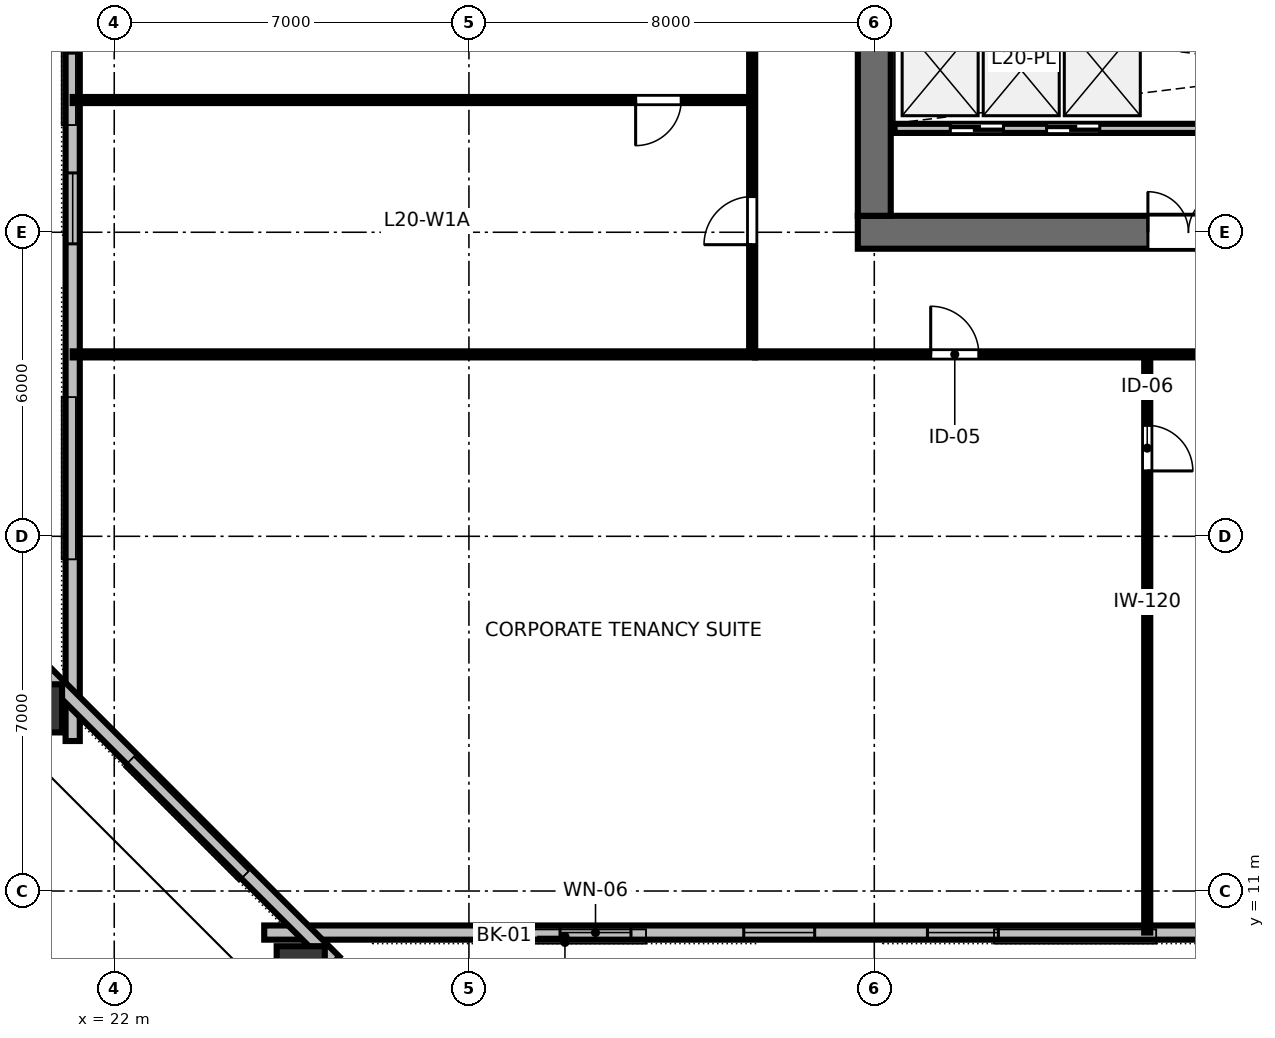
"""IFC4 building model, lengths in metres.
Left out: names, types, materials, properties, quantities, classifications, styles, units other than length and angle.
Written with IfcOpenShell. Run it as: python <this file> out.ifc"""

import sys

from ifc_helpers import new_model, si_unit, direction, frame, frame_2d, origin, origin_2d, place, context, subcontext, project, spatial, rectangle, hollow_rectangle, extrude, element, fill, save


model = new_model("IFC4")
c1 = context("Model", 3, precision=1e-05, world=origin(), true_north=direction((0.0, 1.0)))
c2 = subcontext(c1, "Body", "Model", "MODEL_VIEW")
j1 = project(units=[si_unit("LENGTHUNIT", "METRE"), si_unit("PLANEANGLEUNIT", "RADIAN")], contexts=[c1])
p1 = place(None, origin())
s1 = spatial("IfcSite", under=j1, at=p1, CompositionType="ELEMENT")
p2 = place(p1, origin())
s2 = spatial("IfcBuilding", under=s1, at=p2, CompositionType="ELEMENT")
p3 = place(p2, frame((0.0, 0.0, 78.4)))
s3 = spatial("IfcBuildingStorey", under=s2, at=p3, CompositionType="ELEMENT", Elevation=78.4)
p4 = place(p3, frame((36.675, 24.0, 0.0), z_axis=(0.0, 0.0, 1.0), x_axis=(1.0, 0.0, 0.0)))
e1 = element("IfcWall", 1, at=p4, inside=s3, PredefinedType="SHEAR", context=c2, shape_type="SweptSolid", body=[
    extrude(rectangle(XDim=18.65, YDim=0.65, at=frame_2d((9.325, 0.0))), origin(), (0.0, 0.0, 1.0), 3.36),
])
p5 = place(p4, frame((5.725, 0.0, 0.0)))
e2 = element("IfcOpeningElement", 2, at=p5, cuts=e1, PredefinedType="OPENING", context=c2, shape_type="SweptSolid", body=[
    extrude(rectangle(XDim=1.6, YDim=2.15, at=frame_2d((0.8, 1.075))), frame((0.0, 0.335, 0.0), z_axis=(0.0, -1.0, 0.0), x_axis=(1.0, 0.0, 0.0)), (0.0, 0.0, 1.0), 0.67),
])
p6 = place(p4, frame((12.125, 0.0, 0.0)))
e3 = element("IfcOpeningElement", 3, at=p6, cuts=e1, PredefinedType="OPENING", context=c2, shape_type="SweptSolid", body=[
    extrude(rectangle(XDim=1.6, YDim=2.15, at=frame_2d((0.8, 1.075))), frame((0.0, 0.335, 0.0), z_axis=(0.0, -1.0, 0.0), x_axis=(1.0, 0.0, 0.0)), (0.0, 0.0, 1.0), 0.67),
])
p7 = place(p3, frame((37.0, 24.325, 0.0), z_axis=(0.0, 0.0, 1.0), x_axis=(0.0, 1.0, 0.0)))
e4 = element("IfcWall", 4, at=p7, inside=s3, PredefinedType="SHEAR", context=c2, shape_type="SweptSolid", body=[
    extrude(rectangle(XDim=15.35, YDim=0.65, at=frame_2d((7.675, 0.0))), origin(), (0.0, 0.0, 1.0), 3.36),
])
p8 = place(p7, frame((5.2, 0.0, 0.0)))
e5 = element("IfcOpeningElement", 5, at=p8, cuts=e4, PredefinedType="OPENING", context=c2, shape_type="SweptSolid", body=[
    extrude(rectangle(XDim=1.15, YDim=2.15, at=frame_2d((0.575, 1.075))), frame((0.0, 0.335, 0.0), z_axis=(0.0, -1.0, 0.0), x_axis=(1.0, 0.0, 0.0)), (0.0, 0.0, 1.0), 0.67),
])
p9 = place(p3, frame((25.681, 9.336, 0.0), z_axis=(0.227706652534, 0.158346926777, 0.960768406627), x_axis=(-0.570924282853, 0.821002718174, 0.0)))
e6 = element("IfcColumn", 6, at=p9, inside=s3, PredefinedType="COLUMN", context=c2, shape_type="SweptSolid", body=[
    extrude(hollow_rectangle(XDim=0.95, YDim=1.15, WallThickness=0.06, at=origin_2d()), origin(), (0.0, 0.0, 1.0), 3.495),
])
p10 = place(p3, frame((20.396, 14.604, 0.0), z_axis=(0.186998264307, 0.199376234682, 0.961915155401), x_axis=(-0.658048855079, -0.701607062764, 0.273348191525)))
e7 = element("IfcColumn", 7, at=p10, inside=s3, PredefinedType="COLUMN", context=c2, shape_type="SweptSolid", body=[
    extrude(hollow_rectangle(XDim=0.95, YDim=1.15, WallThickness=0.06, at=origin_2d()), origin(), (0.0, 0.0, 1.0), 3.491),
])
p11 = place(p3, frame((24.96, 10.18, 0.0), z_axis=(0.0, 0.0, 1.0), x_axis=(1.0, 0.0, 0.0)))
e8 = element("IfcWall", 8, at=p11, inside=s3, PredefinedType="STANDARD", context=c2, shape_type="SweptSolid", body=[
    extrude(rectangle(XDim=42.08, YDim=0.28, at=frame_2d((21.04, 0.0))), origin(), (0.0, 0.0, 1.0), 2.662),
])
p12 = place(p11, frame((5.838, 0.0, 0.85)))
e9 = element("IfcOpeningElement", 9, at=p12, cuts=e8, PredefinedType="OPENING", context=c2, shape_type="SweptSolid", body=[
    extrude(rectangle(XDim=1.4, YDim=1.2, at=frame_2d((0.7, 0.6))), frame((0.0, 0.15, 0.0), z_axis=(0.0, -1.0, 0.0), x_axis=(1.0, 0.0, 0.0)), (0.0, 0.0, 1.0), 0.3),
])
p13 = place(p11, frame((9.464, 0.0, 0.85)))
e10 = element("IfcOpeningElement", 10, at=p13, cuts=e8, PredefinedType="OPENING", context=c2, shape_type="SweptSolid", body=[
    extrude(rectangle(XDim=1.4, YDim=1.2, at=frame_2d((0.7, 0.6))), frame((0.0, 0.15, 0.0), z_axis=(0.0, -1.0, 0.0), x_axis=(1.0, 0.0, 0.0)), (0.0, 0.0, 1.0), 0.3),
])
p14 = place(p11, frame((13.089, 0.0, 0.85)))
e11 = element("IfcOpeningElement", 11, at=p14, cuts=e8, PredefinedType="OPENING", context=c2, shape_type="SweptSolid", body=[
    extrude(rectangle(XDim=1.4, YDim=1.2, at=frame_2d((0.7, 0.6))), frame((0.0, 0.15, 0.0), z_axis=(0.0, -1.0, 0.0), x_axis=(1.0, 0.0, 0.0)), (0.0, 0.0, 1.0), 0.3),
])
p15 = place(p11, frame((23.966, 0.0, 0.85)))
e12 = element("IfcOpeningElement", 12, at=p15, cuts=e8, PredefinedType="OPENING", context=c2, shape_type="SweptSolid", body=[
    extrude(rectangle(XDim=1.4, YDim=1.2, at=frame_2d((0.7, 0.6))), frame((0.0, 0.15, 0.0), z_axis=(0.0, -1.0, 0.0), x_axis=(1.0, 0.0, 0.0)), (0.0, 0.0, 1.0), 0.3),
])
p16 = place(p11, frame((27.591, 0.0, 0.85)))
e13 = element("IfcOpeningElement", 13, at=p16, cuts=e8, PredefinedType="OPENING", context=c2, shape_type="SweptSolid", body=[
    extrude(rectangle(XDim=1.4, YDim=1.2, at=frame_2d((0.7, 0.6))), frame((0.0, 0.15, 0.0), z_axis=(0.0, -1.0, 0.0), x_axis=(1.0, 0.0, 0.0)), (0.0, 0.0, 1.0), 0.3),
])
p17 = place(p11, frame((31.216, 0.0, 0.85)))
e14 = element("IfcOpeningElement", 14, at=p17, cuts=e8, PredefinedType="OPENING", context=c2, shape_type="SweptSolid", body=[
    extrude(rectangle(XDim=1.4, YDim=1.2, at=frame_2d((0.7, 0.6))), frame((0.0, 0.15, 0.0), z_axis=(0.0, -1.0, 0.0), x_axis=(1.0, 0.0, 0.0)), (0.0, 0.0, 1.0), 0.3),
])
p18 = place(p11, frame((34.842, 0.0, 0.85)))
e15 = element("IfcOpeningElement", 15, at=p18, cuts=e8, PredefinedType="OPENING", context=c2, shape_type="SweptSolid", body=[
    extrude(rectangle(XDim=1.4, YDim=1.2, at=frame_2d((0.7, 0.6))), frame((0.0, 0.15, 0.0), z_axis=(0.0, -1.0, 0.0), x_axis=(1.0, 0.0, 0.0)), (0.0, 0.0, 1.0), 0.3),
])
p19 = place(p3, frame((21.18, 50.04, 0.0), z_axis=(0.0, 0.0, 1.0), x_axis=(0.0, -1.0, 0.0)))
e16 = element("IfcWall", 16, at=p19, inside=s3, PredefinedType="STANDARD", context=c2, shape_type="SweptSolid", body=[
    extrude(rectangle(XDim=36.08, YDim=0.28, at=frame_2d((18.04, 0.0))), origin(), (0.0, 0.0, 1.0), 2.662),
])
p20 = place(p19, frame((9.811, 0.0, 0.85)))
e17 = element("IfcOpeningElement", 17, at=p20, cuts=e16, PredefinedType="OPENING", context=c2, shape_type="SweptSolid", body=[
    extrude(rectangle(XDim=1.4, YDim=1.2, at=frame_2d((0.7, 0.6))), frame((0.0, 0.15, 0.0), z_axis=(0.0, -1.0, 0.0), x_axis=(1.0, 0.0, 0.0)), (0.0, 0.0, 1.0), 0.3),
])
p21 = place(p19, frame((13.576, 0.0, 0.85)))
e18 = element("IfcOpeningElement", 18, at=p21, cuts=e16, PredefinedType="OPENING", context=c2, shape_type="SweptSolid", body=[
    extrude(rectangle(XDim=1.4, YDim=1.2, at=frame_2d((0.7, 0.6))), frame((0.0, 0.15, 0.0), z_axis=(0.0, -1.0, 0.0), x_axis=(1.0, 0.0, 0.0)), (0.0, 0.0, 1.0), 0.3),
])
p22 = place(p19, frame((21.104, 0.0, 0.85)))
e19 = element("IfcOpeningElement", 19, at=p22, cuts=e16, PredefinedType="OPENING", context=c2, shape_type="SweptSolid", body=[
    extrude(rectangle(XDim=1.4, YDim=1.2, at=frame_2d((0.7, 0.6))), frame((0.0, 0.15, 0.0), z_axis=(0.0, -1.0, 0.0), x_axis=(1.0, 0.0, 0.0)), (0.0, 0.0, 1.0), 0.3),
])
p23 = place(p19, frame((24.869, 0.0, 0.85)))
e20 = element("IfcOpeningElement", 20, at=p23, cuts=e16, PredefinedType="OPENING", context=c2, shape_type="SweptSolid", body=[
    extrude(rectangle(XDim=1.4, YDim=1.2, at=frame_2d((0.7, 0.6))), frame((0.0, 0.15, 0.0), z_axis=(0.0, -1.0, 0.0), x_axis=(1.0, 0.0, 0.0)), (0.0, 0.0, 1.0), 0.3),
])
p24 = place(p3, frame((20.606, 15.345, 0.0), z_axis=(0.0, 0.0, 1.0), x_axis=(0.707106781187, -0.707106781187, 0.0)))
e21 = element("IfcWall", 21, at=p24, inside=s3, PredefinedType="STANDARD", context=c2, shape_type="SweptSolid", body=[
    extrude(rectangle(XDim=8.116, YDim=0.28, at=frame_2d((4.058, 0.0))), origin(), (0.0, 0.0, 1.0), 2.662),
])
p25 = place(p3, frame((37.4, 26.05, 0.0), z_axis=(0.0, 0.0, 1.0), x_axis=(1.0, 0.0, 0.0)))
e22 = element("IfcWall", 22, at=p25, inside=s3, PredefinedType="PARTITIONING", context=c2, shape_type="SweptSolid", body=[
    extrude(rectangle(XDim=17.2, YDim=0.18, at=frame_2d((8.6, 0.0))), origin(), (0.0, 0.0, 1.0), 3.36),
])
p26 = place(p25, frame((1.1, 0.0, 0.0)))
e23 = element("IfcOpeningElement", 23, at=p26, cuts=e22, PredefinedType="OPENING", context=c2, shape_type="SweptSolid", body=[
    extrude(rectangle(XDim=1.05, YDim=2.15, at=frame_2d((0.525, 1.075))), frame((0.0, 0.1, 0.0), z_axis=(0.0, -1.0, 0.0), x_axis=(1.0, 0.0, 0.0)), (0.0, 0.0, 1.0), 0.2),
])
p27 = place(p25, frame((3.0, 0.0, 0.0)))
e24 = element("IfcOpeningElement", 24, at=p27, cuts=e22, PredefinedType="OPENING", context=c2, shape_type="SweptSolid", body=[
    extrude(rectangle(XDim=1.05, YDim=2.15, at=frame_2d((0.525, 1.075))), frame((0.0, 0.1, 0.0), z_axis=(0.0, -1.0, 0.0), x_axis=(1.0, 0.0, 0.0)), (0.0, 0.0, 1.0), 0.2),
])
p28 = place(p3, frame((42.387, 21.59, 0.0), z_axis=(0.0, 0.0, 1.0), x_axis=(0.0, -1.0, 0.0)))
e25 = element("IfcWall", 25, at=p28, inside=s3, PredefinedType="PARTITIONING", context=c2, shape_type="SweptSolid", body=[
    extrude(rectangle(XDim=11.41, YDim=0.12, at=frame_2d((5.705, 0.0))), origin(), (0.0, 0.0, 1.0), 2.64),
])
p29 = place(p28, frame((1.4, 0.0, 0.0)))
e26 = element("IfcOpeningElement", 26, at=p29, cuts=e25, PredefinedType="OPENING", context=c2, shape_type="SweptSolid", body=[
    extrude(rectangle(XDim=0.9, YDim=2.15, at=frame_2d((0.45, 1.075))), frame((0.0, 0.07, 0.0), z_axis=(0.0, -1.0, 0.0), x_axis=(1.0, 0.0, 0.0)), (0.0, 0.0, 1.0), 0.14),
])
p30 = place(p3, frame((34.65, 21.59, 0.0), z_axis=(0.0, 0.0, 1.0), x_axis=(1.0, 0.0, 0.0)))
e27 = element("IfcWall", 27, at=p30, inside=s3, PredefinedType="PARTITIONING", context=c2, shape_type="SweptSolid", body=[
    extrude(rectangle(XDim=22.7, YDim=0.12, at=frame_2d((11.35, 0.0))), origin(), (0.0, 0.0, 1.0), 2.64),
])
p31 = place(p30, frame((3.463, 0.0, 0.0)))
e28 = element("IfcOpeningElement", 28, at=p31, cuts=e27, PredefinedType="OPENING", context=c2, shape_type="SweptSolid", body=[
    extrude(rectangle(XDim=0.95, YDim=2.15, at=frame_2d((0.475, 1.075))), frame((0.0, 0.07, 0.0), z_axis=(0.0, -1.0, 0.0), x_axis=(1.0, 0.0, 0.0)), (0.0, 0.0, 1.0), 0.14),
])
p32 = place(p30, frame((14.673, 0.0, 0.0)))
e29 = element("IfcOpeningElement", 29, at=p32, cuts=e27, PredefinedType="OPENING", context=c2, shape_type="SweptSolid", body=[
    extrude(rectangle(XDim=0.95, YDim=2.15, at=frame_2d((0.475, 1.075))), frame((0.0, 0.07, 0.0), z_axis=(0.0, -1.0, 0.0), x_axis=(1.0, 0.0, 0.0)), (0.0, 0.0, 1.0), 0.14),
])
p33 = place(p3, frame((34.59, 26.61, 0.0), z_axis=(0.0, 0.0, 1.0), x_axis=(-1.0, 0.0, 0.0)))
e30 = element("IfcWall", 30, at=p33, inside=s3, PredefinedType="PARTITIONING", context=c2, shape_type="SweptSolid", body=[
    extrude(rectangle(XDim=13.41, YDim=0.12, at=frame_2d((6.705, 0.0))), origin(), (0.0, 0.0, 1.0), 2.64),
])
p34 = place(p33, frame((1.4, 0.0, 0.0)))
e31 = element("IfcOpeningElement", 31, at=p34, cuts=e30, PredefinedType="OPENING", context=c2, shape_type="SweptSolid", body=[
    extrude(rectangle(XDim=0.9, YDim=2.15, at=frame_2d((0.45, 1.075))), frame((0.0, 0.07, 0.0), z_axis=(0.0, -1.0, 0.0), x_axis=(1.0, 0.0, 0.0)), (0.0, 0.0, 1.0), 0.14),
])
p35 = place(p3, frame((34.59, 21.65, 0.0), z_axis=(0.0, 0.0, 1.0), x_axis=(0.0, 1.0, 0.0)))
e32 = element("IfcWall", 32, at=p35, inside=s3, PredefinedType="PARTITIONING", context=c2, shape_type="SweptSolid", body=[
    extrude(rectangle(XDim=20.7, YDim=0.12, at=frame_2d((10.35, 0.0))), origin(), (0.0, 0.0, 1.0), 2.64),
])
p36 = place(p35, frame((2.105, 0.0, 0.0)))
e33 = element("IfcOpeningElement", 33, at=p36, cuts=e32, PredefinedType="OPENING", context=c2, shape_type="SweptSolid", body=[
    extrude(rectangle(XDim=0.95, YDim=2.15, at=frame_2d((0.475, 1.075))), frame((0.0, 0.07, 0.0), z_axis=(0.0, -1.0, 0.0), x_axis=(1.0, 0.0, 0.0)), (0.0, 0.0, 1.0), 0.14),
])
p37 = place(p35, frame((7.369, 0.0, 0.0)))
e34 = element("IfcOpeningElement", 34, at=p37, cuts=e32, PredefinedType="OPENING", context=c2, shape_type="SweptSolid", body=[
    extrude(rectangle(XDim=0.95, YDim=2.15, at=frame_2d((0.475, 1.075))), frame((0.0, 0.07, 0.0), z_axis=(0.0, -1.0, 0.0), x_axis=(1.0, 0.0, 0.0)), (0.0, 0.0, 1.0), 0.14),
])
p38 = place(p35, frame((15.139, 0.0, 0.0)))
e35 = element("IfcOpeningElement", 35, at=p38, cuts=e32, PredefinedType="OPENING", context=c2, shape_type="SweptSolid", body=[
    extrude(rectangle(XDim=0.95, YDim=2.15, at=frame_2d((0.475, 1.075))), frame((0.0, 0.07, 0.0), z_axis=(0.0, -1.0, 0.0), x_axis=(1.0, 0.0, 0.0)), (0.0, 0.0, 1.0), 0.14),
])
p39 = place(p3, frame((34.65, 21.59, 0.0), z_axis=(0.0, 0.0, 1.0), x_axis=(-1.0, 0.0, 0.0)))
e36 = element("IfcWall", 36, at=p39, inside=s3, PredefinedType="PARTITIONING", context=c2, shape_type="SweptSolid", body=[
    extrude(rectangle(XDim=13.47, YDim=0.12, at=frame_2d((6.735, 0.0))), origin(), (0.0, 0.0, 1.0), 2.64),
])
p40 = place(p12, origin())
e37 = element("IfcWindow", 37, at=p40, inside=s3, PartitioningType="SINGLE_PANEL", PredefinedType="WINDOW", context=c2, shape_type="SweptSolid", body=[
    extrude(rectangle(XDim=1.4, YDim=1.2, at=frame_2d((0.7, 0.6))), frame((0.0, 0.03, 0.0), z_axis=(0.0, -1.0, 0.0), x_axis=(1.0, 0.0, 0.0)), (0.0, 0.0, 1.0), 0.06),
])
fill(e9, e37)
p41 = place(p13, origin())
e38 = element("IfcWindow", 38, at=p41, inside=s3, PartitioningType="SINGLE_PANEL", PredefinedType="WINDOW", context=c2, shape_type="SweptSolid", body=[
    extrude(rectangle(XDim=1.4, YDim=1.2, at=frame_2d((0.7, 0.6))), frame((0.0, 0.03, 0.0), z_axis=(0.0, -1.0, 0.0), x_axis=(1.0, 0.0, 0.0)), (0.0, 0.0, 1.0), 0.06),
])
fill(e10, e38)
p42 = place(p14, origin())
e39 = element("IfcWindow", 39, at=p42, inside=s3, PartitioningType="SINGLE_PANEL", PredefinedType="WINDOW", context=c2, shape_type="SweptSolid", body=[
    extrude(rectangle(XDim=1.4, YDim=1.2, at=frame_2d((0.7, 0.6))), frame((0.0, 0.03, 0.0), z_axis=(0.0, -1.0, 0.0), x_axis=(1.0, 0.0, 0.0)), (0.0, 0.0, 1.0), 0.06),
])
fill(e11, e39)
p43 = place(p22, origin())
e40 = element("IfcWindow", 40, at=p43, inside=s3, PartitioningType="SINGLE_PANEL", PredefinedType="WINDOW", context=c2, shape_type="SweptSolid", body=[
    extrude(rectangle(XDim=1.4, YDim=1.2, at=frame_2d((0.7, 0.6))), frame((0.0, 0.03, 0.0), z_axis=(0.0, -1.0, 0.0), x_axis=(1.0, 0.0, 0.0)), (0.0, 0.0, 1.0), 0.06),
])
fill(e19, e40)
p44 = place(p23, origin())
e41 = element("IfcWindow", 41, at=p44, inside=s3, PartitioningType="SINGLE_PANEL", PredefinedType="WINDOW", context=c2, shape_type="SweptSolid", body=[
    extrude(rectangle(XDim=1.4, YDim=1.2, at=frame_2d((0.7, 0.6))), frame((0.0, 0.03, 0.0), z_axis=(0.0, -1.0, 0.0), x_axis=(1.0, 0.0, 0.0)), (0.0, 0.0, 1.0), 0.06),
])
fill(e20, e41)
p45 = place(p5, origin())
e42 = element("IfcDoor", 42, at=p45, inside=s3, OperationType="DOUBLE_DOOR_SINGLE_SWING", PredefinedType="DOOR", context=c2, shape_type="SweptSolid", body=[
    extrude(rectangle(XDim=1.6, YDim=2.15, at=frame_2d((0.8, 1.075))), frame((0.0, 0.025, 0.0), z_axis=(0.0, -1.0, 0.0), x_axis=(1.0, 0.0, 0.0)), (0.0, 0.0, 1.0), 0.05),
])
fill(e2, e42)
p46 = place(p26, origin())
e43 = element("IfcDoor", 43, at=p46, inside=s3, OperationType="SLIDING_TO_LEFT", PredefinedType="DOOR", context=c2, shape_type="SweptSolid", body=[
    extrude(rectangle(XDim=1.05, YDim=2.15, at=frame_2d((0.525, 1.075))), frame((0.0, 0.025, 0.0), z_axis=(0.0, -1.0, 0.0), x_axis=(1.0, 0.0, 0.0)), (0.0, 0.0, 1.0), 0.05),
])
fill(e23, e43)
p47 = place(p27, origin())
e44 = element("IfcDoor", 44, at=p47, inside=s3, OperationType="SLIDING_TO_RIGHT", PredefinedType="DOOR", context=c2, shape_type="SweptSolid", body=[
    extrude(rectangle(XDim=1.05, YDim=2.15, at=frame_2d((0.525, 1.075))), frame((0.0, 0.025, 0.0), z_axis=(0.0, -1.0, 0.0), x_axis=(1.0, 0.0, 0.0)), (0.0, 0.0, 1.0), 0.05),
])
fill(e24, e44)
p48 = place(p29, origin())
e45 = element("IfcDoor", 45, at=p48, inside=s3, OperationType="SINGLE_SWING_RIGHT", PredefinedType="DOOR", context=c2, shape_type="SweptSolid", body=[
    extrude(rectangle(XDim=0.9, YDim=2.15, at=frame_2d((0.45, 1.075))), frame((0.0, 0.025, 0.0), z_axis=(0.0, -1.0, 0.0), x_axis=(1.0, 0.0, 0.0)), (0.0, 0.0, 1.0), 0.05),
])
fill(e26, e45)
p49 = place(p31, origin())
e46 = element("IfcDoor", 46, at=p49, inside=s3, OperationType="SINGLE_SWING_LEFT", PredefinedType="DOOR", context=c2, shape_type="SweptSolid", body=[
    extrude(rectangle(XDim=0.95, YDim=2.15, at=frame_2d((0.475, 1.075))), frame((0.0, 0.025, 0.0), z_axis=(0.0, -1.0, 0.0), x_axis=(1.0, 0.0, 0.0)), (0.0, 0.0, 1.0), 0.05),
])
fill(e28, e46)
p50 = place(p34, origin())
e47 = element("IfcDoor", 47, at=p50, inside=s3, OperationType="SINGLE_SWING_RIGHT", PredefinedType="DOOR", context=c2, shape_type="SweptSolid", body=[
    extrude(rectangle(XDim=0.9, YDim=2.15, at=frame_2d((0.45, 1.075))), frame((0.0, 0.025, 0.0), z_axis=(0.0, -1.0, 0.0), x_axis=(1.0, 0.0, 0.0)), (0.0, 0.0, 1.0), 0.05),
])
fill(e31, e47)
p51 = place(p36, origin())
e48 = element("IfcDoor", 48, at=p51, inside=s3, OperationType="SINGLE_SWING_LEFT", PredefinedType="DOOR", context=c2, shape_type="SweptSolid", body=[
    extrude(rectangle(XDim=0.95, YDim=2.15, at=frame_2d((0.475, 1.075))), frame((0.0, 0.025, 0.0), z_axis=(0.0, -1.0, 0.0), x_axis=(1.0, 0.0, 0.0)), (0.0, 0.0, 1.0), 0.05),
])
fill(e33, e48)
save(model, sys.argv[1])
